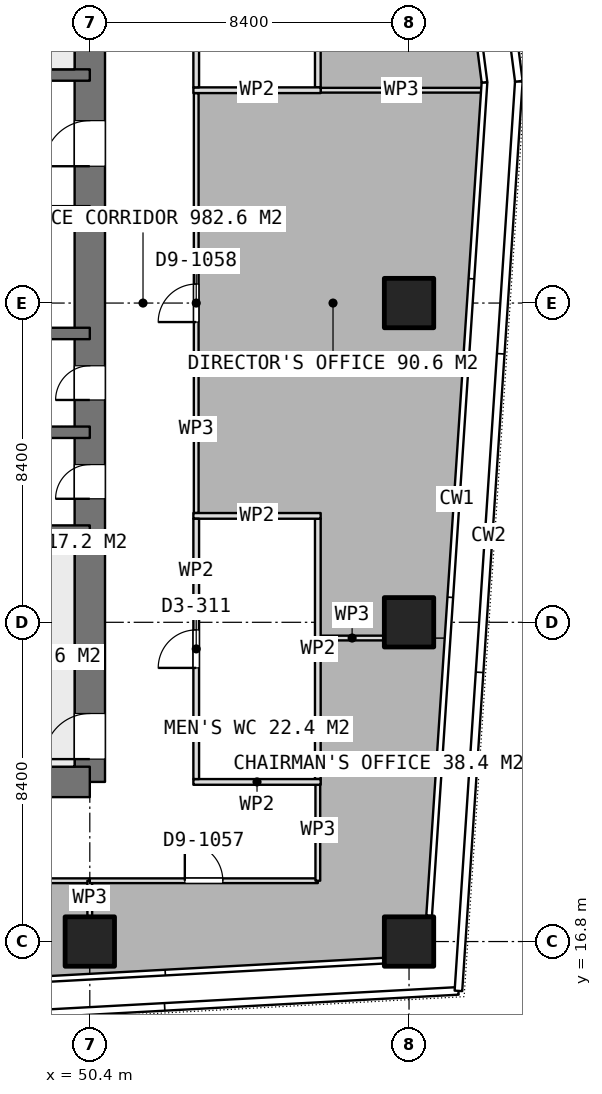
"""IFC4 building model, lengths in metres.
Left out: names, types, materials, properties, quantities, classifications, styles, units other than length and angle.
Written with IfcOpenShell. Run it as: python <this file> out.ifc"""

import sys

from ifc_helpers import new_model, si_unit, direction, frame, frame_2d, origin, origin_2d, place, context, subcontext, project, spatial, rectangle, extrude, element, fill, save


model = new_model("IFC4")
c1 = context("Model", 3, precision=1e-05, world=origin(), true_north=direction((0.0, 1.0)))
c2 = subcontext(c1, "Body", "Model", "MODEL_VIEW")
j1 = project(units=[si_unit("LENGTHUNIT", "METRE"), si_unit("PLANEANGLEUNIT", "RADIAN")], contexts=[c1])
p1 = place(None, origin())
s1 = spatial("IfcSite", under=j1, at=p1, CompositionType="ELEMENT")
p2 = place(p1, origin())
s2 = spatial("IfcBuilding", under=s1, at=p2, CompositionType="ELEMENT")
p3 = place(p2, frame((0.0, 0.0, 287.6)))
s3 = spatial("IfcBuildingStorey", under=s2, at=p3, CompositionType="ELEMENT", Elevation=287.6)
p4 = place(p3, frame((40.0, 21.0, 0.0), z_axis=(0.0, 0.0, 1.0), x_axis=(1.0, 0.0, 0.0)))
e1 = element("IfcWall", 1, at=p4, inside=s3, PredefinedType="SHEAR", context=c2, shape_type="SweptSolid", body=[
    extrude(rectangle(XDim=10.4, YDim=0.8, at=frame_2d((5.2, 0.0))), origin(), (0.0, 0.0, 1.0), 3.75),
])
p5 = place(p3, frame((50.4, 21.0, 0.0), z_axis=(0.0, 0.0, 1.0), x_axis=(0.0, 1.0, 0.0)))
e2 = element("IfcWall", 2, at=p5, inside=s3, PredefinedType="SHEAR", context=c2, shape_type="SweptSolid", body=[
    extrude(rectangle(XDim=25.2, YDim=0.8, at=frame_2d((12.6, 0.0))), origin(), (0.0, 0.0, 1.0), 3.75),
])
p6 = place(p5, frame((16.2, 0.0, 0.0)))
e3 = element("IfcOpeningElement", 3, at=p6, cuts=e2, PredefinedType="OPENING", context=c2, shape_type="SweptSolid", body=[
    extrude(rectangle(XDim=1.2, YDim=2.1, at=frame_2d((0.6, 1.05))), frame((0.0, 0.41, 0.0), z_axis=(0.0, -1.0, 0.0), x_axis=(1.0, 0.0, 0.0)), (0.0, 0.0, 1.0), 0.82),
])
p7 = place(p5, frame((10.05, 0.0, 0.0)))
e4 = element("IfcOpeningElement", 4, at=p7, cuts=e2, PredefinedType="OPENING", context=c2, shape_type="SweptSolid", body=[
    extrude(rectangle(XDim=0.9, YDim=2.1, at=frame_2d((0.45, 1.05))), frame((0.0, 0.41, 0.0), z_axis=(0.0, -1.0, 0.0), x_axis=(1.0, 0.0, 0.0)), (0.0, 0.0, 1.0), 0.82),
])
p8 = place(p5, frame((7.45, 0.0, 0.0)))
e5 = element("IfcOpeningElement", 5, at=p8, cuts=e2, PredefinedType="OPENING", context=c2, shape_type="SweptSolid", body=[
    extrude(rectangle(XDim=0.9, YDim=2.1, at=frame_2d((0.45, 1.05))), frame((0.0, 0.41, 0.0), z_axis=(0.0, -1.0, 0.0), x_axis=(1.0, 0.0, 0.0)), (0.0, 0.0, 1.0), 0.82),
])
p9 = place(p5, frame((0.6, 0.0, 0.0)))
e6 = element("IfcOpeningElement", 6, at=p9, cuts=e2, PredefinedType="OPENING", context=c2, shape_type="SweptSolid", body=[
    extrude(rectangle(XDim=1.2, YDim=2.1, at=frame_2d((0.6, 1.05))), frame((0.0, 0.41, 0.0), z_axis=(0.0, -1.0, 0.0), x_axis=(1.0, 0.0, 0.0)), (0.0, 0.0, 1.0), 0.82),
])
for number, where, z_axis, x_axis in (
    (7, (43.8, 27.6, 0.0), (0.0, 0.0, 1.0), (1.0, 0.0, 0.0)),
    (8, (43.8, 30.2, 0.0), (0.0, 0.0, 1.0), (1.0, 0.0, 0.0)),
    (9, (43.8, 32.8, 0.0), (0.0, 0.0, 1.0), (1.0, 0.0, 0.0)),
):
    element("IfcWall", number, at=place(p3, frame(where, z_axis=z_axis, x_axis=x_axis)), inside=s3, PredefinedType="SHEAR", context=c2, shape_type="SweptSolid", body=[
        extrude(rectangle(XDim=6.6, YDim=0.3, at=frame_2d((3.3, 0.0))), origin(), (0.0, 0.0, 1.0), 3.75),
    ])
p10 = place(p3, frame((43.8, 36.0, 0.0), z_axis=(0.0, 0.0, 1.0), x_axis=(1.0, 0.0, 0.0)))
e10 = element("IfcWall", 10, at=p10, inside=s3, PredefinedType="SHEAR", context=c2, shape_type="SweptSolid", body=[
    extrude(rectangle(XDim=6.6, YDim=0.3, at=frame_2d((3.3, 0.0))), origin(), (0.0, 0.0, 1.0), 3.75),
])
p11 = place(p10, frame((2.65, 0.0, 0.0)))
e11 = element("IfcOpeningElement", 11, at=p11, cuts=e10, PredefinedType="OPENING", context=c2, shape_type="SweptSolid", body=[
    extrude(rectangle(XDim=1.3, YDim=2.1, at=frame_2d((0.65, 1.05))), frame((0.0, 0.16, 0.0), z_axis=(0.0, -1.0, 0.0), x_axis=(1.0, 0.0, 0.0)), (0.0, 0.0, 1.0), 0.32),
])
p12 = place(p3, frame((43.8, 39.6, 0.0), z_axis=(0.0, 0.0, 1.0), x_axis=(1.0, 0.0, 0.0)))
e12 = element("IfcWall", 12, at=p12, inside=s3, PredefinedType="SHEAR", context=c2, shape_type="SweptSolid", body=[
    extrude(rectangle(XDim=6.6, YDim=0.3, at=frame_2d((3.3, 0.0))), origin(), (0.0, 0.0, 1.0), 3.75),
])
p13 = place(p12, frame((0.35, 0.0, 0.0)))
e13 = element("IfcOpeningElement", 13, at=p13, cuts=e12, PredefinedType="OPENING", context=c2, shape_type="SweptSolid", body=[
    extrude(rectangle(XDim=1.2, YDim=2.1, at=frame_2d((0.6, 1.05))), frame((0.0, 0.16, 0.0), z_axis=(0.0, -1.0, 0.0), x_axis=(1.0, 0.0, 0.0)), (0.0, 0.0, 1.0), 0.32),
])
for number, where, z_axis, x_axis in (
    (14, (50.4, 16.8, 0.0), (0.0, 0.0, 1.0), (1.0, 0.0, 0.0)),
    (15, (58.8, 16.8, 0.0), (0.0, 0.0, 1.0), (1.0, 0.0, 0.0)),
    (16, (58.8, 25.2, 0.0), (0.0, 0.0, 1.0), (1.0, 0.0, 0.0)),
    (17, (58.8, 33.6, 0.0), (0.0, 0.0, 1.0), (1.0, 0.0, 0.0)),
):
    element("IfcColumn", number, at=place(p3, frame(where, z_axis=z_axis, x_axis=x_axis)), inside=s3, PredefinedType="COLUMN", context=c2, shape_type="SweptSolid", body=[
        extrude(rectangle(XDim=1.3, YDim=1.3, at=origin_2d()), origin(), (0.0, 0.0, 1.0), 3.75),
    ])
p14 = place(p3, frame((53.125, 39.2, 0.0), z_axis=(0.0, 0.0, 1.0), x_axis=(1.0, 0.0, 0.0)))
e18 = element("IfcWall", 18, at=p14, inside=s3, PredefinedType="PARTITIONING", context=c2, shape_type="SweptSolid", body=[
    extrude(rectangle(XDim=3.35, YDim=0.15, at=frame_2d((1.675, 0.0))), origin(), (0.0, 0.0, 1.0), 3.45),
])
p15 = place(p3, frame((53.2, 39.275, 0.0), z_axis=(0.0, 0.0, 1.0), x_axis=(0.0, 1.0, 0.0)))
e19 = element("IfcWall", 19, at=p15, inside=s3, PredefinedType="PARTITIONING", context=c2, shape_type="SweptSolid", body=[
    extrude(rectangle(XDim=6.85, YDim=0.15, at=frame_2d((3.425, 0.0))), origin(), (0.0, 0.0, 1.0), 3.45),
])
p16 = place(p15, frame((2.925, 0.0, 0.0)))
e20 = element("IfcOpeningElement", 20, at=p16, cuts=e19, PredefinedType="OPENING", context=c2, shape_type="SweptSolid", body=[
    extrude(rectangle(XDim=1.0, YDim=2.1, at=frame_2d((0.5, 1.05))), frame((0.0, 0.085, 0.0), z_axis=(0.0, -1.0, 0.0), x_axis=(1.0, 0.0, 0.0)), (0.0, 0.0, 1.0), 0.17),
])
p17 = place(p3, frame((56.4, 39.275, 0.0), z_axis=(0.0, 0.0, 1.0), x_axis=(0.0, 1.0, 0.0)))
e21 = element("IfcWall", 21, at=p17, inside=s3, PredefinedType="PARTITIONING", context=c2, shape_type="SweptSolid", body=[
    extrude(rectangle(XDim=6.85, YDim=0.15, at=frame_2d((3.425, 0.0))), origin(), (0.0, 0.0, 1.0), 3.45),
])
for number, where, z_axis, x_axis in (
    (22, (53.125, 21.0, 0.0), (0.0, 0.0, 1.0), (1.0, 0.0, 0.0)),
    (23, (53.125, 28.0, 0.0), (0.0, 0.0, 1.0), (1.0, 0.0, 0.0)),
):
    element("IfcWall", number, at=place(p3, frame(where, z_axis=z_axis, x_axis=x_axis)), inside=s3, PredefinedType="PARTITIONING", context=c2, shape_type="SweptSolid", body=[
        extrude(rectangle(XDim=3.35, YDim=0.15, at=frame_2d((1.675, 0.0))), origin(), (0.0, 0.0, 1.0), 3.45),
    ])
p18 = place(p3, frame((53.2, 21.075, 0.0), z_axis=(0.0, 0.0, 1.0), x_axis=(0.0, 1.0, 0.0)))
e24 = element("IfcWall", 24, at=p18, inside=s3, PredefinedType="PARTITIONING", context=c2, shape_type="SweptSolid", body=[
    extrude(rectangle(XDim=6.85, YDim=0.15, at=frame_2d((3.425, 0.0))), origin(), (0.0, 0.0, 1.0), 3.45),
])
p19 = place(p18, frame((2.925, 0.0, 0.0)))
e25 = element("IfcOpeningElement", 25, at=p19, cuts=e24, PredefinedType="OPENING", context=c2, shape_type="SweptSolid", body=[
    extrude(rectangle(XDim=1.0, YDim=2.1, at=frame_2d((0.5, 1.05))), frame((0.0, 0.085, 0.0), z_axis=(0.0, -1.0, 0.0), x_axis=(1.0, 0.0, 0.0)), (0.0, 0.0, 1.0), 0.17),
])
p20 = place(p3, frame((56.4, 21.075, 0.0), z_axis=(0.0, 0.0, 1.0), x_axis=(0.0, 1.0, 0.0)))
e26 = element("IfcWall", 26, at=p20, inside=s3, PredefinedType="PARTITIONING", context=c2, shape_type="SweptSolid", body=[
    extrude(rectangle(XDim=6.85, YDim=0.15, at=frame_2d((3.425, 0.0))), origin(), (0.0, 0.0, 1.0), 3.45),
])
p21 = place(p3, frame((42.674, 18.4, 0.0), z_axis=(0.0, 0.0, 1.0), x_axis=(1.0, 0.0, 0.0)))
e27 = element("IfcWall", 27, at=p21, inside=s3, PredefinedType="PARTITIONING", context=c2, shape_type="SweptSolid", body=[
    extrude(rectangle(XDim=7.725, YDim=0.125, at=frame_2d((3.862, 0.0))), origin(), (0.0, 0.0, 1.0), 3.45),
])
p22 = place(p21, frame((3.363, 0.0, 0.0)))
e28 = element("IfcOpeningElement", 28, at=p22, cuts=e27, PredefinedType="OPENING", context=c2, shape_type="SweptSolid", body=[
    extrude(rectangle(XDim=1.0, YDim=2.1, at=frame_2d((0.5, 1.05))), frame((0.0, 0.073, 0.0), z_axis=(0.0, -1.0, 0.0), x_axis=(1.0, 0.0, 0.0)), (0.0, 0.0, 1.0), 0.145),
])
p23 = place(p3, frame((50.399, 18.4, 0.0), z_axis=(0.0, 0.0, 1.0), x_axis=(0.0, -1.0, 0.0)))
e29 = element("IfcWall", 29, at=p23, inside=s3, PredefinedType="PARTITIONING", context=c2, shape_type="SweptSolid", body=[
    extrude(rectangle(XDim=0.93, YDim=0.125, at=frame_2d((0.465, 0.0))), origin(), (0.0, 0.0, 1.0), 3.45),
])
p24 = place(p3, frame((50.4, 18.4, 0.0), z_axis=(0.0, 0.0, 1.0), x_axis=(1.0, 0.0, 0.0)))
e30 = element("IfcWall", 30, at=p24, inside=s3, PredefinedType="PARTITIONING", context=c2, shape_type="SweptSolid", body=[
    extrude(rectangle(XDim=6.0, YDim=0.125, at=frame_2d((3.0, 0.0))), origin(), (0.0, 0.0, 1.0), 3.45),
])
p25 = place(p24, frame((2.5, 0.0, 0.0)))
e31 = element("IfcOpeningElement", 31, at=p25, cuts=e30, PredefinedType="OPENING", context=c2, shape_type="SweptSolid", body=[
    extrude(rectangle(XDim=1.0, YDim=2.1, at=frame_2d((0.5, 1.05))), frame((0.0, 0.073, 0.0), z_axis=(0.0, -1.0, 0.0), x_axis=(1.0, 0.0, 0.0)), (0.0, 0.0, 1.0), 0.145),
])
p26 = place(p3, frame((56.4, 18.4, 0.0), z_axis=(0.0, 0.0, 1.0), x_axis=(0.0, 1.0, 0.0)))
e32 = element("IfcWall", 32, at=p26, inside=s3, PredefinedType="PARTITIONING", context=c2, shape_type="SweptSolid", body=[
    extrude(rectangle(XDim=2.675, YDim=0.125, at=frame_2d((1.337, 0.0))), origin(), (0.0, 0.0, 1.0), 3.45),
])
p27 = place(p3, frame((56.475, 24.786, 0.0), z_axis=(0.0, 0.0, 1.0), x_axis=(1.0, 0.0, 0.0)))
e33 = element("IfcWall", 33, at=p27, inside=s3, PredefinedType="PARTITIONING", context=c2, shape_type="SweptSolid", body=[
    extrude(rectangle(XDim=1.655, YDim=0.125, at=frame_2d((0.827, 0.0))), origin(), (0.0, 0.0, 1.0), 3.45),
])
p28 = place(p3, frame((53.2, 28.075, 0.0), z_axis=(0.0, 0.0, 1.0), x_axis=(0.0, 1.0, 0.0)))
e34 = element("IfcWall", 34, at=p28, inside=s3, PredefinedType="PARTITIONING", context=c2, shape_type="SweptSolid", body=[
    extrude(rectangle(XDim=11.05, YDim=0.125, at=frame_2d((5.525, 0.0))), origin(), (0.0, 0.0, 1.0), 3.45),
])
p29 = place(p28, frame((5.025, 0.0, 0.0)))
e35 = element("IfcOpeningElement", 35, at=p29, cuts=e34, PredefinedType="OPENING", context=c2, shape_type="SweptSolid", body=[
    extrude(rectangle(XDim=1.0, YDim=2.1, at=frame_2d((0.5, 1.05))), frame((0.0, 0.073, 0.0), z_axis=(0.0, -1.0, 0.0), x_axis=(1.0, 0.0, 0.0)), (0.0, 0.0, 1.0), 0.145),
])
p30 = place(p3, frame((56.476, 39.2, 0.0), z_axis=(0.0, 0.0, 1.0), x_axis=(1.0, 0.0, 0.0)))
e36 = element("IfcWall", 36, at=p30, inside=s3, PredefinedType="PARTITIONING", context=c2, shape_type="SweptSolid", body=[
    extrude(rectangle(XDim=4.246, YDim=0.125, at=frame_2d((2.123, 0.0))), origin(), (0.0, 0.0, 1.0), 3.45),
])
p31 = place(p6, origin())
e37 = element("IfcDoor", 37, at=p31, inside=s3, OperationType="SINGLE_SWING_LEFT", PredefinedType="DOOR", context=c2, shape_type="SweptSolid", body=[
    extrude(rectangle(XDim=1.2, YDim=2.1, at=frame_2d((0.6, 1.05))), frame((0.0, 0.025, 0.0), z_axis=(0.0, -1.0, 0.0), x_axis=(1.0, 0.0, 0.0)), (0.0, 0.0, 1.0), 0.05),
])
fill(e3, e37)
p32 = place(p7, origin())
e38 = element("IfcDoor", 38, at=p32, inside=s3, OperationType="SINGLE_SWING_LEFT", PredefinedType="DOOR", context=c2, shape_type="SweptSolid", body=[
    extrude(rectangle(XDim=0.9, YDim=2.1, at=frame_2d((0.45, 1.05))), frame((0.0, 0.025, 0.0), z_axis=(0.0, -1.0, 0.0), x_axis=(1.0, 0.0, 0.0)), (0.0, 0.0, 1.0), 0.05),
])
fill(e4, e38)
p33 = place(p8, origin())
e39 = element("IfcDoor", 39, at=p33, inside=s3, OperationType="SINGLE_SWING_LEFT", PredefinedType="DOOR", context=c2, shape_type="SweptSolid", body=[
    extrude(rectangle(XDim=0.9, YDim=2.1, at=frame_2d((0.45, 1.05))), frame((0.0, 0.025, 0.0), z_axis=(0.0, -1.0, 0.0), x_axis=(1.0, 0.0, 0.0)), (0.0, 0.0, 1.0), 0.05),
])
fill(e5, e39)
p34 = place(p19, origin())
e40 = element("IfcDoor", 40, at=p34, inside=s3, OperationType="SINGLE_SWING_LEFT", PredefinedType="DOOR", context=c2, shape_type="SweptSolid", body=[
    extrude(rectangle(XDim=1.0, YDim=2.1, at=frame_2d((0.5, 1.05))), frame((0.0, 0.025, 0.0), z_axis=(0.0, -1.0, 0.0), x_axis=(1.0, 0.0, 0.0)), (0.0, 0.0, 1.0), 0.05),
])
fill(e25, e40)
p35 = place(p25, origin())
e41 = element("IfcDoor", 41, at=p35, inside=s3, OperationType="SINGLE_SWING_LEFT", PredefinedType="DOOR", context=c2, shape_type="SweptSolid", body=[
    extrude(rectangle(XDim=1.0, YDim=2.1, at=frame_2d((0.5, 1.05))), frame((0.0, 0.025, 0.0), z_axis=(0.0, -1.0, 0.0), x_axis=(1.0, 0.0, 0.0)), (0.0, 0.0, 1.0), 0.05),
])
fill(e31, e41)
p36 = place(p29, origin())
e42 = element("IfcDoor", 42, at=p36, inside=s3, OperationType="SINGLE_SWING_LEFT", PredefinedType="DOOR", context=c2, shape_type="SweptSolid", body=[
    extrude(rectangle(XDim=1.0, YDim=2.1, at=frame_2d((0.5, 1.05))), frame((0.0, 0.025, 0.0), z_axis=(0.0, -1.0, 0.0), x_axis=(1.0, 0.0, 0.0)), (0.0, 0.0, 1.0), 0.05),
])
fill(e35, e42)
p37 = place(p9, origin())
e43 = element("IfcDoor", 43, at=p37, inside=s3, OperationType="SINGLE_SWING_RIGHT", PredefinedType="DOOR", context=c2, shape_type="SweptSolid", body=[
    extrude(rectangle(XDim=1.2, YDim=2.1, at=frame_2d((0.6, 1.05))), frame((0.0, 0.025, 0.0), z_axis=(0.0, -1.0, 0.0), x_axis=(1.0, 0.0, 0.0)), (0.0, 0.0, 1.0), 0.05),
])
fill(e6, e43)
save(model, sys.argv[1])
